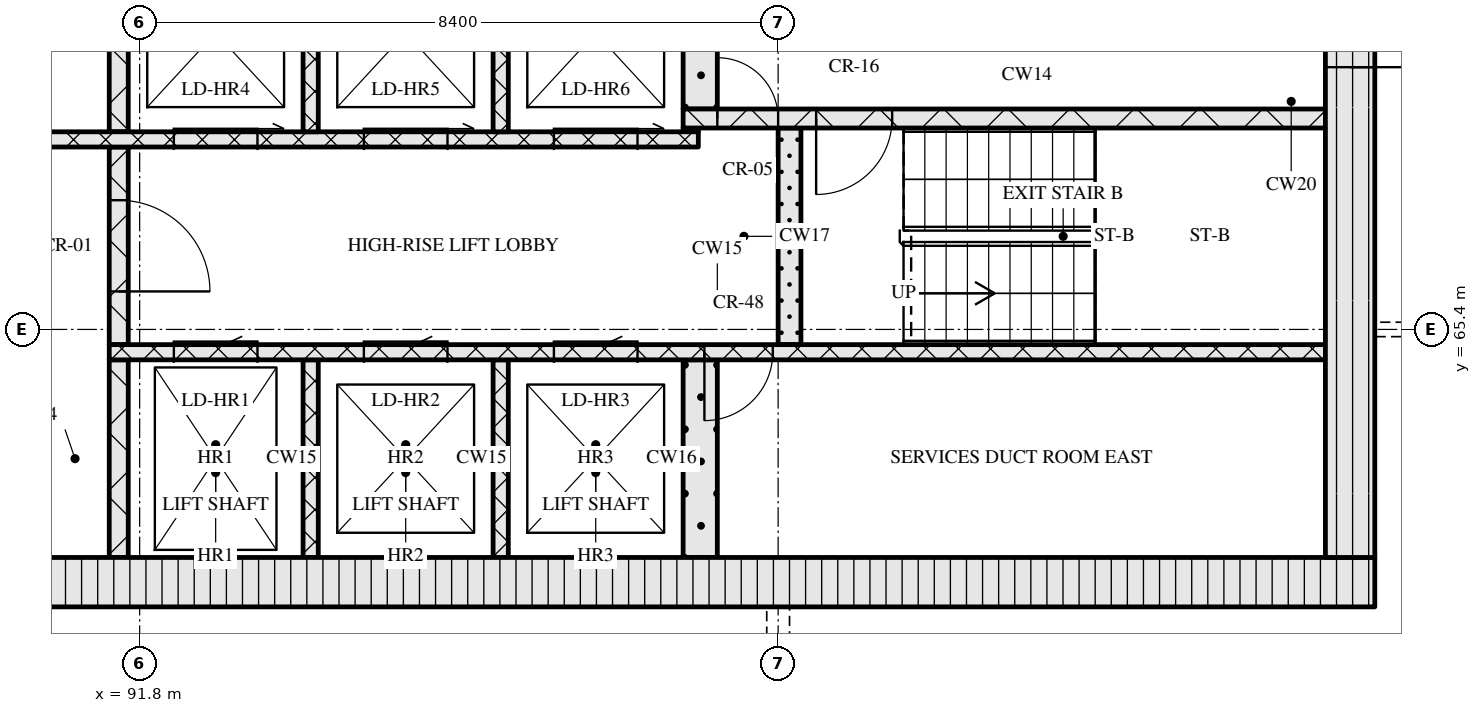
"""IFC4 building model, lengths in metres.
Left out: names, types, materials, properties, quantities, classifications, styles, units other than length and angle.
Written with IfcOpenShell. Run it as: python <this file> out.ifc"""

import sys

from ifc_helpers import new_model, si_unit, direction, frame, frame_2d, origin, place, context, subcontext, project, spatial, rectangle, extrude, element, fill, save


model = new_model("IFC4")
c1 = context("Model", 3, precision=1e-05, world=origin(), true_north=direction((0.0, 1.0)))
c2 = subcontext(c1, "Body", "Model", "MODEL_VIEW")
j1 = project(units=[si_unit("LENGTHUNIT", "METRE"), si_unit("PLANEANGLEUNIT", "RADIAN")], contexts=[c1])
p1 = place(None, origin())
s1 = spatial("IfcSite", under=j1, at=p1, CompositionType="ELEMENT")
p2 = place(p1, origin())
s2 = spatial("IfcBuilding", under=s1, at=p2, CompositionType="ELEMENT")
p3 = place(p2, frame((0.0, 0.0, 227.1)))
s3 = spatial("IfcBuildingStorey", under=s2, at=p3, CompositionType="ELEMENT", Elevation=227.1)
p4 = place(p3, frame((67.15, 62.075, 0.0), z_axis=(0.0, 0.0, 1.0), x_axis=(1.0, 0.0, 0.0)))
e1 = element("IfcWall", 1, at=p4, inside=s3, PredefinedType="SOLIDWALL", context=c2, shape_type="SweptSolid", body=[
    extrude(rectangle(XDim=40.9, YDim=0.65, at=frame_2d((20.45, 0.0))), origin(), (0.0, 0.0, 1.0), 3.32),
])
p5 = place(p4, frame((20.8, 0.0, 0.0)))
e2 = element("IfcOpeningElement", 2, at=p5, cuts=e1, PredefinedType="OPENING", context=c2, shape_type="SweptSolid", body=[
    extrude(rectangle(XDim=1.8, YDim=2.1, at=frame_2d((0.9, 1.05))), frame((0.0, 0.335, 0.0), z_axis=(0.0, -1.0, 0.0), x_axis=(1.0, 0.0, 0.0)), (0.0, 0.0, 1.0), 0.67),
])
p6 = place(p3, frame((107.725, 62.4, 0.0), z_axis=(0.0, 0.0, 1.0), x_axis=(0.0, 1.0, 0.0)))
e3 = element("IfcWall", 3, at=p6, inside=s3, PredefinedType="SOLIDWALL", context=c2, shape_type="SweptSolid", body=[
    extrude(rectangle(XDim=12.0, YDim=0.65, at=frame_2d((6.0, 0.0))), origin(), (0.0, 0.0, 1.0), 3.32),
])
p7 = place(p6, frame((6.45, 0.0, 0.0)))
e4 = element("IfcOpeningElement", 4, at=p7, cuts=e3, PredefinedType="OPENING", context=c2, shape_type="SweptSolid", body=[
    extrude(rectangle(XDim=1.2, YDim=2.1, at=frame_2d((0.6, 1.05))), frame((0.0, 0.335, 0.0), z_axis=(0.0, -1.0, 0.0), x_axis=(1.0, 0.0, 0.0)), (0.0, 0.0, 1.0), 0.67),
])
p8 = place(p3, frame((91.525, 62.4, 0.0), z_axis=(0.0, 0.0, 1.0), x_axis=(0.0, 1.0, 0.0)))
e5 = element("IfcWall", 5, at=p8, inside=s3, PredefinedType="SOLIDWALL", context=c2, shape_type="SweptSolid", body=[
    extrude(rectangle(XDim=2.6, YDim=0.25, at=frame_2d((1.3, 0.0))), origin(), (0.0, 0.0, 1.0), 3.32),
])
for number, where, z_axis, x_axis in (
    (6, (94.05, 62.4, 0.0), (0.0, 0.0, 1.0), (0.0, 1.0, 0.0)),
    (7, (96.55, 62.4, 0.0), (0.0, 0.0, 1.0), (0.0, 1.0, 0.0)),
):
    element("IfcWall", number, at=place(p3, frame(where, z_axis=z_axis, x_axis=x_axis)), inside=s3, PredefinedType="SOLIDWALL", context=c2, shape_type="SweptSolid", body=[
        extrude(rectangle(XDim=2.6, YDim=0.2, at=frame_2d((1.3, 0.0))), origin(), (0.0, 0.0, 1.0), 3.32),
    ])
p9 = place(p3, frame((99.175, 62.4, 0.0), z_axis=(0.0, 0.0, 1.0), x_axis=(0.0, 1.0, 0.0)))
e8 = element("IfcWall", 8, at=p9, inside=s3, PredefinedType="SOLIDWALL", context=c2, shape_type="SweptSolid", body=[
    extrude(rectangle(XDim=2.6, YDim=0.45, at=frame_2d((1.3, 0.0))), origin(), (0.0, 0.0, 1.0), 3.32),
])
p10 = place(p3, frame((91.4, 65.1, 0.0), z_axis=(0.0, 0.0, 1.0), x_axis=(1.0, 0.0, 0.0)))
e9 = element("IfcWall", 9, at=p10, inside=s3, PredefinedType="SOLIDWALL", context=c2, shape_type="SweptSolid", body=[
    extrude(rectangle(XDim=16.0, YDim=0.2, at=frame_2d((8.0, 0.0))), origin(), (0.0, 0.0, 1.0), 3.32),
])
p11 = place(p10, frame((0.85, 0.0, 0.0)))
e10 = element("IfcOpeningElement", 10, at=p11, cuts=e9, PredefinedType="OPENING", context=c2, shape_type="SweptSolid", body=[
    extrude(rectangle(XDim=1.1, YDim=2.1, at=frame_2d((0.55, 1.05))), frame((0.0, 0.11, 0.0), z_axis=(0.0, -1.0, 0.0), x_axis=(1.0, 0.0, 0.0)), (0.0, 0.0, 1.0), 0.22),
])
p12 = place(p10, frame((3.35, 0.0, 0.0)))
e11 = element("IfcOpeningElement", 11, at=p12, cuts=e9, PredefinedType="OPENING", context=c2, shape_type="SweptSolid", body=[
    extrude(rectangle(XDim=1.1, YDim=2.1, at=frame_2d((0.55, 1.05))), frame((0.0, 0.11, 0.0), z_axis=(0.0, -1.0, 0.0), x_axis=(1.0, 0.0, 0.0)), (0.0, 0.0, 1.0), 0.22),
])
p13 = place(p10, frame((5.85, 0.0, 0.0)))
e12 = element("IfcOpeningElement", 12, at=p13, cuts=e9, PredefinedType="OPENING", context=c2, shape_type="SweptSolid", body=[
    extrude(rectangle(XDim=1.1, YDim=2.1, at=frame_2d((0.55, 1.05))), frame((0.0, 0.11, 0.0), z_axis=(0.0, -1.0, 0.0), x_axis=(1.0, 0.0, 0.0)), (0.0, 0.0, 1.0), 0.22),
])
p14 = place(p10, frame((7.83, 0.0, 0.0)))
e13 = element("IfcOpeningElement", 13, at=p14, cuts=e9, PredefinedType="OPENING", context=c2, shape_type="SweptSolid", body=[
    extrude(rectangle(XDim=0.9, YDim=2.1, at=frame_2d((0.45, 1.05))), frame((0.0, 0.11, 0.0), z_axis=(0.0, -1.0, 0.0), x_axis=(1.0, 0.0, 0.0)), (0.0, 0.0, 1.0), 0.22),
])
p15 = place(p3, frame((91.525, 65.2, 0.0), z_axis=(0.0, 0.0, 1.0), x_axis=(0.0, 1.0, 0.0)))
e14 = element("IfcWall", 14, at=p15, inside=s3, PredefinedType="SOLIDWALL", context=c2, shape_type="SweptSolid", body=[
    extrude(rectangle(XDim=2.6, YDim=0.25, at=frame_2d((1.3, 0.0))), origin(), (0.0, 0.0, 1.0), 3.32),
])
p16 = place(p15, frame((0.7, 0.0, 0.0)))
e15 = element("IfcOpeningElement", 15, at=p16, cuts=e14, PredefinedType="OPENING", context=c2, shape_type="SweptSolid", body=[
    extrude(rectangle(XDim=1.2, YDim=2.1, at=frame_2d((0.6, 1.05))), frame((0.0, 0.135, 0.0), z_axis=(0.0, -1.0, 0.0), x_axis=(1.0, 0.0, 0.0)), (0.0, 0.0, 1.0), 0.27),
])
p17 = place(p3, frame((100.35, 65.2, 0.0), z_axis=(0.0, 0.0, 1.0), x_axis=(0.0, 1.0, 0.0)))
e16 = element("IfcWall", 16, at=p17, inside=s3, PredefinedType="SOLIDWALL", context=c2, shape_type="SweptSolid", body=[
    extrude(rectangle(XDim=2.85, YDim=0.3, at=frame_2d((1.425, 0.0))), origin(), (0.0, 0.0, 1.0), 3.32),
])
p18 = place(p3, frame((76.05, 67.9, 0.0), z_axis=(0.0, 0.0, 1.0), x_axis=(1.0, 0.0, 0.0)))
e17 = element("IfcWall", 17, at=p18, inside=s3, PredefinedType="SOLIDWALL", context=c2, shape_type="SweptSolid", body=[
    extrude(rectangle(XDim=23.1, YDim=0.2, at=frame_2d((11.55, 0.0))), origin(), (0.0, 0.0, 1.0), 3.32),
])
p19 = place(p18, frame((1.35, 0.0, 0.0)))
e18 = element("IfcOpeningElement", 18, at=p19, cuts=e17, PredefinedType="OPENING", context=c2, shape_type="SweptSolid", body=[
    extrude(rectangle(XDim=0.9, YDim=2.1, at=frame_2d((0.45, 1.05))), frame((0.0, 0.11, 0.0), z_axis=(0.0, -1.0, 0.0), x_axis=(1.0, 0.0, 0.0)), (0.0, 0.0, 1.0), 0.22),
])
p20 = place(p18, frame((5.06, 0.0, 0.0)))
e19 = element("IfcOpeningElement", 19, at=p20, cuts=e17, PredefinedType="OPENING", context=c2, shape_type="SweptSolid", body=[
    extrude(rectangle(XDim=0.9, YDim=2.1, at=frame_2d((0.45, 1.05))), frame((0.0, 0.11, 0.0), z_axis=(0.0, -1.0, 0.0), x_axis=(1.0, 0.0, 0.0)), (0.0, 0.0, 1.0), 0.22),
])
p21 = place(p18, frame((8.45, 0.0, 0.0)))
e20 = element("IfcOpeningElement", 20, at=p21, cuts=e17, PredefinedType="OPENING", context=c2, shape_type="SweptSolid", body=[
    extrude(rectangle(XDim=0.9, YDim=2.1, at=frame_2d((0.45, 1.05))), frame((0.0, 0.11, 0.0), z_axis=(0.0, -1.0, 0.0), x_axis=(1.0, 0.0, 0.0)), (0.0, 0.0, 1.0), 0.22),
])
p22 = place(p18, frame((10.91, 0.0, 0.0)))
e21 = element("IfcOpeningElement", 21, at=p22, cuts=e17, PredefinedType="OPENING", context=c2, shape_type="SweptSolid", body=[
    extrude(rectangle(XDim=0.9, YDim=2.1, at=frame_2d((0.45, 1.05))), frame((0.0, 0.11, 0.0), z_axis=(0.0, -1.0, 0.0), x_axis=(1.0, 0.0, 0.0)), (0.0, 0.0, 1.0), 0.22),
])
p23 = place(p18, frame((13.55, 0.0, 0.0)))
e22 = element("IfcOpeningElement", 22, at=p23, cuts=e17, PredefinedType="OPENING", context=c2, shape_type="SweptSolid", body=[
    extrude(rectangle(XDim=1.0, YDim=2.1, at=frame_2d((0.5, 1.05))), frame((0.0, 0.11, 0.0), z_axis=(0.0, -1.0, 0.0), x_axis=(1.0, 0.0, 0.0)), (0.0, 0.0, 1.0), 0.22),
])
p24 = place(p18, frame((16.2, 0.0, 0.0)))
e23 = element("IfcOpeningElement", 23, at=p24, cuts=e17, PredefinedType="OPENING", context=c2, shape_type="SweptSolid", body=[
    extrude(rectangle(XDim=1.1, YDim=2.1, at=frame_2d((0.55, 1.05))), frame((0.0, 0.11, 0.0), z_axis=(0.0, -1.0, 0.0), x_axis=(1.0, 0.0, 0.0)), (0.0, 0.0, 1.0), 0.22),
])
p25 = place(p18, frame((18.7, 0.0, 0.0)))
e24 = element("IfcOpeningElement", 24, at=p25, cuts=e17, PredefinedType="OPENING", context=c2, shape_type="SweptSolid", body=[
    extrude(rectangle(XDim=1.1, YDim=2.1, at=frame_2d((0.55, 1.05))), frame((0.0, 0.11, 0.0), z_axis=(0.0, -1.0, 0.0), x_axis=(1.0, 0.0, 0.0)), (0.0, 0.0, 1.0), 0.22),
])
p26 = place(p18, frame((21.2, 0.0, 0.0)))
e25 = element("IfcOpeningElement", 25, at=p26, cuts=e17, PredefinedType="OPENING", context=c2, shape_type="SweptSolid", body=[
    extrude(rectangle(XDim=1.1, YDim=2.1, at=frame_2d((0.55, 1.05))), frame((0.0, 0.11, 0.0), z_axis=(0.0, -1.0, 0.0), x_axis=(1.0, 0.0, 0.0)), (0.0, 0.0, 1.0), 0.22),
])
p27 = place(p3, frame((91.525, 68.0, 0.0), z_axis=(0.0, 0.0, 1.0), x_axis=(0.0, 1.0, 0.0)))
e26 = element("IfcWall", 26, at=p27, inside=s3, PredefinedType="SOLIDWALL", context=c2, shape_type="SweptSolid", body=[
    extrude(rectangle(XDim=2.6, YDim=0.25, at=frame_2d((1.3, 0.0))), origin(), (0.0, 0.0, 1.0), 3.32),
])
for number, where, z_axis, x_axis in (
    (27, (94.05, 68.0, 0.0), (0.0, 0.0, 1.0), (0.0, 1.0, 0.0)),
    (28, (96.55, 68.0, 0.0), (0.0, 0.0, 1.0), (0.0, 1.0, 0.0)),
):
    element("IfcWall", number, at=place(p3, frame(where, z_axis=z_axis, x_axis=x_axis)), inside=s3, PredefinedType="SOLIDWALL", context=c2, shape_type="SweptSolid", body=[
        extrude(rectangle(XDim=2.6, YDim=0.2, at=frame_2d((1.3, 0.0))), origin(), (0.0, 0.0, 1.0), 3.32),
    ])
p28 = place(p3, frame((98.95, 68.025, 0.0), z_axis=(0.0, 0.0, 1.0), x_axis=(1.0, 0.0, 0.0)))
e29 = element("IfcWall", 29, at=p28, inside=s3, PredefinedType="SOLIDWALL", context=c2, shape_type="SweptSolid", body=[
    extrude(rectangle(XDim=0.2, YDim=0.05, at=frame_2d((0.1, 0.0))), origin(), (0.0, 0.0, 1.0), 3.32),
])
p29 = place(p3, frame((98.95, 68.175, 0.0), z_axis=(0.0, 0.0, 1.0), x_axis=(1.0, 0.0, 0.0)))
e30 = element("IfcWall", 30, at=p29, inside=s3, PredefinedType="SOLIDWALL", context=c2, shape_type="SweptSolid", body=[
    extrude(rectangle(XDim=8.45, YDim=0.25, at=frame_2d((4.225, 0.0))), origin(), (0.0, 0.0, 1.0), 3.32),
])
p30 = place(p29, frame((0.45, 0.0, 0.0)))
e31 = element("IfcOpeningElement", 31, at=p30, cuts=e30, PredefinedType="OPENING", context=c2, shape_type="SweptSolid", body=[
    extrude(rectangle(XDim=0.8, YDim=2.1, at=frame_2d((0.4, 1.05))), frame((0.0, 0.135, 0.0), z_axis=(0.0, -1.0, 0.0), x_axis=(1.0, 0.0, 0.0)), (0.0, 0.0, 1.0), 0.27),
])
p31 = place(p29, frame((1.75, 0.0, 0.0)))
e32 = element("IfcOpeningElement", 32, at=p31, cuts=e30, PredefinedType="OPENING", context=c2, shape_type="SweptSolid", body=[
    extrude(rectangle(XDim=1.0, YDim=2.1, at=frame_2d((0.5, 1.05))), frame((0.0, 0.135, 0.0), z_axis=(0.0, -1.0, 0.0), x_axis=(1.0, 0.0, 0.0)), (0.0, 0.0, 1.0), 0.27),
])
p32 = place(p3, frame((99.175, 68.3, 0.0), z_axis=(0.0, 0.0, 1.0), x_axis=(0.0, 1.0, 0.0)))
e33 = element("IfcWall", 33, at=p32, inside=s3, PredefinedType="SOLIDWALL", context=c2, shape_type="SweptSolid", body=[
    extrude(rectangle(XDim=2.3, YDim=0.45, at=frame_2d((1.15, 0.0))), origin(), (0.0, 0.0, 1.0), 3.32),
])
p33 = place(p11, origin())
e34 = element("IfcDoor", 34, at=p33, inside=s3, OperationType="SLIDING_TO_LEFT", PredefinedType="DOOR", context=c2, shape_type="SweptSolid", body=[
    extrude(rectangle(XDim=1.1, YDim=2.1, at=frame_2d((0.55, 1.05))), frame((0.0, 0.025, 0.0), z_axis=(0.0, -1.0, 0.0), x_axis=(1.0, 0.0, 0.0)), (0.0, 0.0, 1.0), 0.05),
])
fill(e10, e34)
p34 = place(p12, origin())
e35 = element("IfcDoor", 35, at=p34, inside=s3, OperationType="SLIDING_TO_LEFT", PredefinedType="DOOR", context=c2, shape_type="SweptSolid", body=[
    extrude(rectangle(XDim=1.1, YDim=2.1, at=frame_2d((0.55, 1.05))), frame((0.0, 0.025, 0.0), z_axis=(0.0, -1.0, 0.0), x_axis=(1.0, 0.0, 0.0)), (0.0, 0.0, 1.0), 0.05),
])
fill(e11, e35)
p35 = place(p13, origin())
e36 = element("IfcDoor", 36, at=p35, inside=s3, OperationType="SLIDING_TO_LEFT", PredefinedType="DOOR", context=c2, shape_type="SweptSolid", body=[
    extrude(rectangle(XDim=1.1, YDim=2.1, at=frame_2d((0.55, 1.05))), frame((0.0, 0.025, 0.0), z_axis=(0.0, -1.0, 0.0), x_axis=(1.0, 0.0, 0.0)), (0.0, 0.0, 1.0), 0.05),
])
fill(e12, e36)
p36 = place(p14, origin())
e37 = element("IfcDoor", 37, at=p36, inside=s3, OperationType="SINGLE_SWING_RIGHT", PredefinedType="DOOR", context=c2, shape_type="SweptSolid", body=[
    extrude(rectangle(XDim=0.9, YDim=2.1, at=frame_2d((0.45, 1.05))), frame((0.0, 0.025, 0.0), z_axis=(0.0, -1.0, 0.0), x_axis=(1.0, 0.0, 0.0)), (0.0, 0.0, 1.0), 0.05),
])
fill(e13, e37)
p37 = place(p16, origin())
e38 = element("IfcDoor", 38, at=p37, inside=s3, OperationType="SINGLE_SWING_RIGHT", PredefinedType="DOOR", context=c2, shape_type="SweptSolid", body=[
    extrude(rectangle(XDim=1.2, YDim=2.1, at=frame_2d((0.6, 1.05))), frame((0.0, 0.025, 0.0), z_axis=(0.0, -1.0, 0.0), x_axis=(1.0, 0.0, 0.0)), (0.0, 0.0, 1.0), 0.05),
])
fill(e15, e38)
p38 = place(p24, origin())
e39 = element("IfcDoor", 39, at=p38, inside=s3, OperationType="SLIDING_TO_RIGHT", PredefinedType="DOOR", context=c2, shape_type="SweptSolid", body=[
    extrude(rectangle(XDim=1.1, YDim=2.1, at=frame_2d((0.55, 1.05))), frame((0.0, 0.025, 0.0), z_axis=(0.0, -1.0, 0.0), x_axis=(1.0, 0.0, 0.0)), (0.0, 0.0, 1.0), 0.05),
])
fill(e23, e39)
p39 = place(p25, origin())
e40 = element("IfcDoor", 40, at=p39, inside=s3, OperationType="SLIDING_TO_RIGHT", PredefinedType="DOOR", context=c2, shape_type="SweptSolid", body=[
    extrude(rectangle(XDim=1.1, YDim=2.1, at=frame_2d((0.55, 1.05))), frame((0.0, 0.025, 0.0), z_axis=(0.0, -1.0, 0.0), x_axis=(1.0, 0.0, 0.0)), (0.0, 0.0, 1.0), 0.05),
])
fill(e24, e40)
p40 = place(p26, origin())
e41 = element("IfcDoor", 41, at=p40, inside=s3, OperationType="SLIDING_TO_RIGHT", PredefinedType="DOOR", context=c2, shape_type="SweptSolid", body=[
    extrude(rectangle(XDim=1.1, YDim=2.1, at=frame_2d((0.55, 1.05))), frame((0.0, 0.025, 0.0), z_axis=(0.0, -1.0, 0.0), x_axis=(1.0, 0.0, 0.0)), (0.0, 0.0, 1.0), 0.05),
])
fill(e25, e41)
p41 = place(p30, origin())
e42 = element("IfcDoor", 42, at=p41, inside=s3, OperationType="SINGLE_SWING_LEFT", PredefinedType="DOOR", context=c2, shape_type="SweptSolid", body=[
    extrude(rectangle(XDim=0.8, YDim=2.1, at=frame_2d((0.4, 1.05))), frame((0.0, 0.025, 0.0), z_axis=(0.0, -1.0, 0.0), x_axis=(1.0, 0.0, 0.0)), (0.0, 0.0, 1.0), 0.05),
])
fill(e31, e42)
p42 = place(p31, origin())
e43 = element("IfcDoor", 43, at=p42, inside=s3, OperationType="SINGLE_SWING_RIGHT", PredefinedType="DOOR", context=c2, shape_type="SweptSolid", body=[
    extrude(rectangle(XDim=1.0, YDim=2.1, at=frame_2d((0.5, 1.05))), frame((0.0, 0.025, 0.0), z_axis=(0.0, -1.0, 0.0), x_axis=(1.0, 0.0, 0.0)), (0.0, 0.0, 1.0), 0.05),
])
fill(e32, e43)
p43 = place(p7, origin())
e44 = element("IfcDoor", 44, at=p43, inside=s3, OperationType="SINGLE_SWING_RIGHT", PredefinedType="DOOR", context=c2, shape_type="SweptSolid", body=[
    extrude(rectangle(XDim=1.2, YDim=2.1, at=frame_2d((0.6, 1.05))), frame((0.0, 0.025, 0.0), z_axis=(0.0, -1.0, 0.0), x_axis=(1.0, 0.0, 0.0)), (0.0, 0.0, 1.0), 0.05),
])
fill(e4, e44)
save(model, sys.argv[1])
